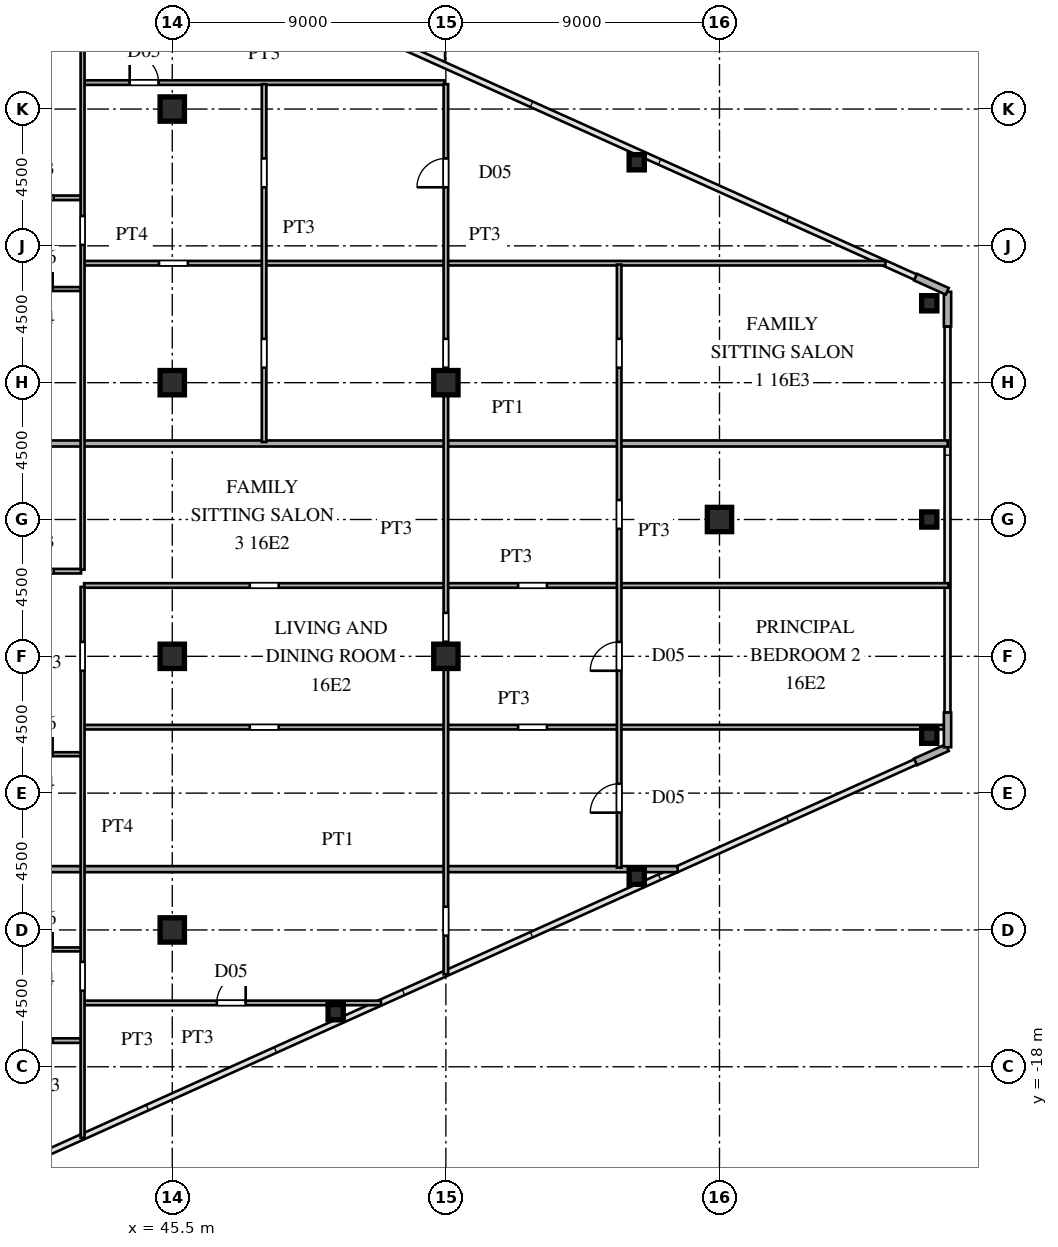
"""IFC4 building model, lengths in metres.
Left out: names, types, materials, properties, quantities, classifications, styles, units other than length and angle.
Written with IfcOpenShell. Run it as: python <this file> out.ifc"""

import sys

from ifc_helpers import new_model, si_unit, direction, frame, frame_2d, origin, origin_2d, place, context, subcontext, project, spatial, rectangle, hollow_rectangle, i_section, extrude, source, transform, mapped, element, fill, save


model = new_model("IFC4")
c1 = context("Model", 3, precision=1e-05, world=origin(), true_north=direction((0.0, 1.0)))
c2 = subcontext(c1, "Body", "Model", "MODEL_VIEW")
j1 = project(units=[si_unit("LENGTHUNIT", "METRE"), si_unit("PLANEANGLEUNIT", "RADIAN")], contexts=[c1])
p1 = place(None, origin())
s1 = spatial("IfcSite", under=j1, at=p1, CompositionType="ELEMENT")
p2 = place(p1, origin())
s2 = spatial("IfcBuilding", under=s1, at=p2, CompositionType="ELEMENT")
p3 = place(p2, frame((0.0, 0.0, 62.1)))
s3 = spatial("IfcBuildingStorey", under=s2, at=p3, CompositionType="ELEMENT", Elevation=62.1)
m1 = source(origin(), c2, "Body", "SweptSolid", [
    extrude(i_section(OverallWidth=0.8, OverallDepth=0.8, WebThickness=0.032, FlangeThickness=0.05, at=origin_2d()), origin(), (0.0, 0.0, 1.0), 3.6),
])
for number, where, z_axis, x_axis in (
    (1, (45.5, -13.5, 0.0), (0.0, 0.0, 1.0), (1.0, 0.0, 0.0)),
    (2, (45.5, -4.5, 0.0), (0.0, 0.0, 1.0), (1.0, 0.0, 0.0)),
    (3, (45.5, 4.5, 0.0), (0.0, 0.0, 1.0), (1.0, 0.0, 0.0)),
    (4, (45.5, 13.5, 0.0), (0.0, 0.0, 1.0), (1.0, 0.0, 0.0)),
    (5, (54.5, -4.5, 0.0), (0.0, 0.0, 1.0), (1.0, 0.0, 0.0)),
    (6, (54.5, 4.5, 0.0), (0.0, 0.0, 1.0), (1.0, 0.0, 0.0)),
    (7, (63.5, 0.0, 0.0), (0.0, 0.0, 1.0), (1.0, 0.0, 0.0)),
):
    element("IfcColumn", number, at=place(p3, frame(where, z_axis=z_axis, x_axis=x_axis)), inside=s3, PredefinedType="COLUMN", context=c2, shape_type="MappedRepresentation", body=[
        mapped(m1, transform((0.0, 0.0, 0.0), scale=1.0)),
    ])
m2 = source(origin(), c2, "Body", "SweptSolid", [
    extrude(hollow_rectangle(XDim=0.5, YDim=0.5, WallThickness=0.02, at=origin_2d()), origin(), (0.0, 0.0, 1.0), 3.6),
])
for number, where, z_axis, x_axis in (
    (8, (70.4, -7.112, 0.0), (0.0, 0.0, 1.0), (1.0, 0.0, 0.0)),
    (9, (70.4, 7.112, 0.0), (0.0, 0.0, 1.0), (1.0, 0.0, 0.0)),
    (10, (50.875, -16.205, 0.0), (0.0, 0.0, 1.0), (1.0, 0.0, 0.0)),
    (11, (60.778, -11.749, 0.0), (0.0, 0.0, 1.0), (1.0, 0.0, 0.0)),
    (12, (60.778, 11.749, 0.0), (0.0, 0.0, 1.0), (1.0, 0.0, 0.0)),
    (13, (70.4, 0.0, 0.0), (0.0, 0.0, 1.0), (1.0, 0.0, 0.0)),
):
    element("IfcColumn", number, at=place(p3, frame(where, z_axis=z_axis, x_axis=x_axis)), inside=s3, PredefinedType="COLUMN", context=c2, shape_type="MappedRepresentation", body=[
        mapped(m2, transform((0.0, 0.0, 0.0), scale=1.0)),
    ])
for number, where, z_axis, x_axis in (
    (14, (69.951, -7.972, 0.0), (0.0, 0.0, 1.0), (0.912, 0.41, 0.0)),
    (15, (71.0, -7.49, 0.0), (0.0, 0.0, 1.0), (0.0, 1.0, 0.0)),
    (16, (71.0, 6.35, 0.0), (0.0, 0.0, 1.0), (0.0, 1.0, 0.0)),
    (17, (70.991, 7.504, 0.0), (0.0, 0.0, 1.0), (-0.912, 0.41, 0.0)),
):
    element("IfcWall", number, at=place(p3, frame(where, z_axis=z_axis, x_axis=x_axis)), inside=s3, PredefinedType="SOLIDWALL", context=c2, shape_type="SweptSolid", body=[
        extrude(rectangle(XDim=1.14, YDim=0.24, at=frame_2d((0.57, 0.0))), origin(), (0.0, 0.0, 1.0), 3.38),
    ])
p4 = place(p3, frame((39.7, -17.14, 0.0), z_axis=(0.0, 0.0, 1.0), x_axis=(1.0, 0.0, 0.0)))
e18 = element("IfcWall", 18, at=p4, inside=s3, PredefinedType="PARTITIONING", context=c2, shape_type="SweptSolid", body=[
    extrude(rectangle(XDim=2.8, YDim=0.15, at=frame_2d((1.4, 0.0))), origin(), (0.0, 0.0, 1.0), 3.38),
])
p5 = place(p4, frame((0.925, 0.0, 0.0)))
e19 = element("IfcOpeningElement", 19, at=p5, cuts=e18, PredefinedType="OPENING", context=c2, shape_type="SweptSolid", body=[
    extrude(rectangle(XDim=0.95, YDim=2.15, at=frame_2d((0.475, 1.075))), frame((0.0, 0.085, 0.0), z_axis=(0.0, -1.0, 0.0), x_axis=(1.0, 0.0, 0.0)), (0.0, 0.0, 1.0), 0.17),
])
p6 = place(p3, frame((42.6, -15.9, 0.0), z_axis=(0.0, 0.0, 1.0), x_axis=(1.0, 0.0, 0.0)))
e20 = element("IfcWall", 20, at=p6, inside=s3, PredefinedType="PARTITIONING", context=c2, shape_type="SweptSolid", body=[
    extrude(rectangle(XDim=9.765, YDim=0.15, at=frame_2d((4.882, 0.0))), origin(), (0.0, 0.0, 1.0), 3.38),
])
p7 = place(p6, frame((4.365, 0.0, 0.0)))
e21 = element("IfcOpeningElement", 21, at=p7, cuts=e20, PredefinedType="OPENING", context=c2, shape_type="SweptSolid", body=[
    extrude(rectangle(XDim=0.95, YDim=2.15, at=frame_2d((0.475, 1.075))), frame((0.0, 0.085, 0.0), z_axis=(0.0, -1.0, 0.0), x_axis=(1.0, 0.0, 0.0)), (0.0, 0.0, 1.0), 0.17),
])
p8 = place(p3, frame((39.75, -14.14, 0.0), z_axis=(0.0, 0.0, 1.0), x_axis=(1.0, 0.0, 0.0)))
e22 = element("IfcWall", 22, at=p8, inside=s3, PredefinedType="PARTITIONING", context=c2, shape_type="SweptSolid", body=[
    extrude(rectangle(XDim=2.75, YDim=0.13, at=frame_2d((1.375, 0.0))), origin(), (0.0, 0.0, 1.0), 3.38),
])
p9 = place(p8, frame((0.935, 0.0, 0.0)))
e23 = element("IfcOpeningElement", 23, at=p9, cuts=e22, PredefinedType="OPENING", context=c2, shape_type="SweptSolid", body=[
    extrude(rectangle(XDim=0.88, YDim=2.1, at=frame_2d((0.44, 1.05))), frame((0.0, 0.075, 0.0), z_axis=(0.0, -1.0, 0.0), x_axis=(1.0, 0.0, 0.0)), (0.0, 0.0, 1.0), 0.15),
])
p10 = place(p3, frame((39.78, -11.5, 0.0), z_axis=(0.0, 0.0, 1.0), x_axis=(1.0, 0.0, 0.0)))
e24 = element("IfcWall", 24, at=p10, inside=s3, PredefinedType="PARTITIONING", context=c2, shape_type="SweptSolid", body=[
    extrude(rectangle(XDim=22.343, YDim=0.2, at=frame_2d((11.171, 0.0))), origin(), (0.0, 0.0, 1.0), 3.38),
])
p11 = place(p3, frame((39.75, -7.72, 0.0), z_axis=(0.0, 0.0, 1.0), x_axis=(1.0, 0.0, 0.0)))
e25 = element("IfcWall", 25, at=p11, inside=s3, PredefinedType="PARTITIONING", context=c2, shape_type="SweptSolid", body=[
    extrude(rectangle(XDim=2.75, YDim=0.13, at=frame_2d((1.375, 0.0))), origin(), (0.0, 0.0, 1.0), 3.38),
])
p12 = place(p11, frame((0.935, 0.0, 0.0)))
e26 = element("IfcOpeningElement", 26, at=p12, cuts=e25, PredefinedType="OPENING", context=c2, shape_type="SweptSolid", body=[
    extrude(rectangle(XDim=0.88, YDim=2.1, at=frame_2d((0.44, 1.05))), frame((0.0, 0.075, 0.0), z_axis=(0.0, -1.0, 0.0), x_axis=(1.0, 0.0, 0.0)), (0.0, 0.0, 1.0), 0.15),
])
p13 = place(p3, frame((42.6, -6.83, 0.0), z_axis=(0.0, 0.0, 1.0), x_axis=(1.0, 0.0, 0.0)))
e27 = element("IfcWall", 27, at=p13, inside=s3, PredefinedType="PARTITIONING", context=c2, shape_type="SweptSolid", body=[
    extrude(rectangle(XDim=28.275, YDim=0.15, at=frame_2d((14.137, 0.0))), origin(), (0.0, 0.0, 1.0), 3.38),
])
p14 = place(p13, frame((5.45, 0.0, 0.0)))
e28 = element("IfcOpeningElement", 28, at=p14, cuts=e27, PredefinedType="OPENING", context=c2, shape_type="SweptSolid", body=[
    extrude(rectangle(XDim=0.95, YDim=2.15, at=frame_2d((0.475, 1.075))), frame((0.0, 0.085, 0.0), z_axis=(0.0, -1.0, 0.0), x_axis=(1.0, 0.0, 0.0)), (0.0, 0.0, 1.0), 0.17),
])
p15 = place(p13, frame((14.275, 0.0, 0.0)))
e29 = element("IfcOpeningElement", 29, at=p15, cuts=e27, PredefinedType="OPENING", context=c2, shape_type="SweptSolid", body=[
    extrude(rectangle(XDim=0.95, YDim=2.15, at=frame_2d((0.475, 1.075))), frame((0.0, 0.085, 0.0), z_axis=(0.0, -1.0, 0.0), x_axis=(1.0, 0.0, 0.0)), (0.0, 0.0, 1.0), 0.17),
])
p16 = place(p3, frame((42.6, -2.17, 0.0), z_axis=(0.0, 0.0, 1.0), x_axis=(1.0, 0.0, 0.0)))
e30 = element("IfcWall", 30, at=p16, inside=s3, PredefinedType="PARTITIONING", context=c2, shape_type="SweptSolid", body=[
    extrude(rectangle(XDim=28.435, YDim=0.15, at=frame_2d((14.217, 0.0))), origin(), (0.0, 0.0, 1.0), 3.38),
])
p17 = place(p16, frame((5.45, 0.0, 0.0)))
e31 = element("IfcOpeningElement", 31, at=p17, cuts=e30, PredefinedType="OPENING", context=c2, shape_type="SweptSolid", body=[
    extrude(rectangle(XDim=0.95, YDim=2.15, at=frame_2d((0.475, 1.075))), frame((0.0, 0.085, 0.0), z_axis=(0.0, -1.0, 0.0), x_axis=(1.0, 0.0, 0.0)), (0.0, 0.0, 1.0), 0.17),
])
p18 = place(p16, frame((14.275, 0.0, 0.0)))
e32 = element("IfcOpeningElement", 32, at=p18, cuts=e30, PredefinedType="OPENING", context=c2, shape_type="SweptSolid", body=[
    extrude(rectangle(XDim=0.95, YDim=2.15, at=frame_2d((0.475, 1.075))), frame((0.0, 0.085, 0.0), z_axis=(0.0, -1.0, 0.0), x_axis=(1.0, 0.0, 0.0)), (0.0, 0.0, 1.0), 0.17),
])
p19 = place(p3, frame((39.75, -1.7, 0.0), z_axis=(0.0, 0.0, 1.0), x_axis=(1.0, 0.0, 0.0)))
e33 = element("IfcWall", 33, at=p19, inside=s3, PredefinedType="PARTITIONING", context=c2, shape_type="SweptSolid", body=[
    extrude(rectangle(XDim=2.75, YDim=0.15, at=frame_2d((1.375, 0.0))), origin(), (0.0, 0.0, 1.0), 3.38),
])
p20 = place(p19, frame((0.9, 0.0, 0.0)))
e34 = element("IfcOpeningElement", 34, at=p20, cuts=e33, PredefinedType="OPENING", context=c2, shape_type="SweptSolid", body=[
    extrude(rectangle(XDim=0.95, YDim=2.15, at=frame_2d((0.475, 1.075))), frame((0.0, 0.085, 0.0), z_axis=(0.0, -1.0, 0.0), x_axis=(1.0, 0.0, 0.0)), (0.0, 0.0, 1.0), 0.17),
])
p21 = place(p3, frame((39.78, 2.5, 0.0), z_axis=(0.0, 0.0, 1.0), x_axis=(1.0, 0.0, 0.0)))
e35 = element("IfcWall", 35, at=p21, inside=s3, PredefinedType="PARTITIONING", context=c2, shape_type="SweptSolid", body=[
    extrude(rectangle(XDim=31.225, YDim=0.2, at=frame_2d((15.612, 0.0))), origin(), (0.0, 0.0, 1.0), 3.38),
])
p22 = place(p3, frame((39.75, 7.58, 0.0), z_axis=(0.0, 0.0, 1.0), x_axis=(1.0, 0.0, 0.0)))
e36 = element("IfcWall", 36, at=p22, inside=s3, PredefinedType="PARTITIONING", context=c2, shape_type="SweptSolid", body=[
    extrude(rectangle(XDim=2.75, YDim=0.13, at=frame_2d((1.375, 0.0))), origin(), (0.0, 0.0, 1.0), 3.38),
])
p23 = place(p22, frame((0.935, 0.0, 0.0)))
e37 = element("IfcOpeningElement", 37, at=p23, cuts=e36, PredefinedType="OPENING", context=c2, shape_type="SweptSolid", body=[
    extrude(rectangle(XDim=0.88, YDim=2.1, at=frame_2d((0.44, 1.05))), frame((0.0, 0.075, 0.0), z_axis=(0.0, -1.0, 0.0), x_axis=(1.0, 0.0, 0.0)), (0.0, 0.0, 1.0), 0.15),
])
p24 = place(p3, frame((42.6, 8.43, 0.0), z_axis=(0.0, 0.0, 1.0), x_axis=(1.0, 0.0, 0.0)))
e38 = element("IfcWall", 38, at=p24, inside=s3, PredefinedType="PARTITIONING", context=c2, shape_type="SweptSolid", body=[
    extrude(rectangle(XDim=26.359, YDim=0.15, at=frame_2d((13.179, 0.0))), origin(), (0.0, 0.0, 1.0), 3.38),
])
p25 = place(p24, frame((2.462, 0.0, 0.0)))
e39 = element("IfcOpeningElement", 39, at=p25, cuts=e38, PredefinedType="OPENING", context=c2, shape_type="SweptSolid", body=[
    extrude(rectangle(XDim=0.95, YDim=2.15, at=frame_2d((0.475, 1.075))), frame((0.0, 0.085, 0.0), z_axis=(0.0, -1.0, 0.0), x_axis=(1.0, 0.0, 0.0)), (0.0, 0.0, 1.0), 0.17),
])
p26 = place(p3, frame((39.75, 10.58, 0.0), z_axis=(0.0, 0.0, 1.0), x_axis=(1.0, 0.0, 0.0)))
e40 = element("IfcWall", 40, at=p26, inside=s3, PredefinedType="PARTITIONING", context=c2, shape_type="SweptSolid", body=[
    extrude(rectangle(XDim=2.75, YDim=0.15, at=frame_2d((1.375, 0.0))), origin(), (0.0, 0.0, 1.0), 3.38),
])
p27 = place(p26, frame((0.9, 0.0, 0.0)))
e41 = element("IfcOpeningElement", 41, at=p27, cuts=e40, PredefinedType="OPENING", context=c2, shape_type="SweptSolid", body=[
    extrude(rectangle(XDim=0.95, YDim=2.15, at=frame_2d((0.475, 1.075))), frame((0.0, 0.085, 0.0), z_axis=(0.0, -1.0, 0.0), x_axis=(1.0, 0.0, 0.0)), (0.0, 0.0, 1.0), 0.17),
])
p28 = place(p3, frame((42.6, 14.37, 0.0), z_axis=(0.0, 0.0, 1.0), x_axis=(1.0, 0.0, 0.0)))
e42 = element("IfcWall", 42, at=p28, inside=s3, PredefinedType="PARTITIONING", context=c2, shape_type="SweptSolid", body=[
    extrude(rectangle(XDim=11.85, YDim=0.15, at=frame_2d((5.925, 0.0))), origin(), (0.0, 0.0, 1.0), 3.38),
])
p29 = place(p28, frame((1.5, 0.0, 0.0)))
e43 = element("IfcOpeningElement", 43, at=p29, cuts=e42, PredefinedType="OPENING", context=c2, shape_type="SweptSolid", body=[
    extrude(rectangle(XDim=0.95, YDim=2.15, at=frame_2d((0.475, 1.075))), frame((0.0, 0.085, 0.0), z_axis=(0.0, -1.0, 0.0), x_axis=(1.0, 0.0, 0.0)), (0.0, 0.0, 1.0), 0.17),
])
p30 = place(p3, frame((42.55, -20.337, 0.0), z_axis=(0.0, 0.0, 1.0), x_axis=(0.0, 1.0, 0.0)))
e44 = element("IfcWall", 44, at=p30, inside=s3, PredefinedType="PARTITIONING", context=c2, shape_type="SweptSolid", body=[
    extrude(rectangle(XDim=18.12, YDim=0.13, at=frame_2d((9.06, 0.0))), origin(), (0.0, 0.0, 1.0), 3.38),
])
p31 = place(p30, frame((4.839, 0.0, 0.0)))
e45 = element("IfcOpeningElement", 45, at=p31, cuts=e44, PredefinedType="OPENING", context=c2, shape_type="SweptSolid", body=[
    extrude(rectangle(XDim=0.95, YDim=2.15, at=frame_2d((0.475, 1.075))), frame((0.0, 0.075, 0.0), z_axis=(0.0, -1.0, 0.0), x_axis=(1.0, 0.0, 0.0)), (0.0, 0.0, 1.0), 0.15),
])
p32 = place(p30, frame((15.362, 0.0, 0.0)))
e46 = element("IfcOpeningElement", 46, at=p32, cuts=e44, PredefinedType="OPENING", context=c2, shape_type="SweptSolid", body=[
    extrude(rectangle(XDim=0.95, YDim=2.15, at=frame_2d((0.475, 1.075))), frame((0.0, 0.075, 0.0), z_axis=(0.0, -1.0, 0.0), x_axis=(1.0, 0.0, 0.0)), (0.0, 0.0, 1.0), 0.15),
])
p33 = place(p3, frame((42.55, -1.648, 0.0), z_axis=(0.0, 0.0, 1.0), x_axis=(0.0, 1.0, 0.0)))
e47 = element("IfcWall", 47, at=p33, inside=s3, PredefinedType="PARTITIONING", context=c2, shape_type="SweptSolid", body=[
    extrude(rectangle(XDim=21.985, YDim=0.13, at=frame_2d((10.992, 0.0))), origin(), (0.0, 0.0, 1.0), 3.38),
])
p34 = place(p33, frame((10.679, 0.0, 0.0)))
e48 = element("IfcOpeningElement", 48, at=p34, cuts=e47, PredefinedType="OPENING", context=c2, shape_type="SweptSolid", body=[
    extrude(rectangle(XDim=0.95, YDim=2.15, at=frame_2d((0.475, 1.075))), frame((0.0, 0.075, 0.0), z_axis=(0.0, -1.0, 0.0), x_axis=(1.0, 0.0, 0.0)), (0.0, 0.0, 1.0), 0.15),
])
p35 = place(p3, frame((48.52, 2.55, 0.0), z_axis=(0.0, 0.0, 1.0), x_axis=(0.0, 1.0, 0.0)))
e49 = element("IfcWall", 49, at=p35, inside=s3, PredefinedType="PARTITIONING", context=c2, shape_type="SweptSolid", body=[
    extrude(rectangle(XDim=11.768, YDim=0.15, at=frame_2d((5.884, 0.0))), origin(), (0.0, 0.0, 1.0), 3.38),
])
p36 = place(p35, frame((8.376, 0.0, 0.0)))
e50 = element("IfcOpeningElement", 50, at=p36, cuts=e49, PredefinedType="OPENING", context=c2, shape_type="SweptSolid", body=[
    extrude(rectangle(XDim=0.95, YDim=2.15, at=frame_2d((0.475, 1.075))), frame((0.0, 0.085, 0.0), z_axis=(0.0, -1.0, 0.0), x_axis=(1.0, 0.0, 0.0)), (0.0, 0.0, 1.0), 0.17),
])
p37 = place(p35, frame((2.442, 0.0, 0.0)))
e51 = element("IfcOpeningElement", 51, at=p37, cuts=e49, PredefinedType="OPENING", context=c2, shape_type="SweptSolid", body=[
    extrude(rectangle(XDim=0.95, YDim=2.15, at=frame_2d((0.475, 1.075))), frame((0.0, 0.085, 0.0), z_axis=(0.0, -1.0, 0.0), x_axis=(1.0, 0.0, 0.0)), (0.0, 0.0, 1.0), 0.17),
])
p38 = place(p3, frame((54.5, -14.96, 0.0), z_axis=(0.0, 0.0, 1.0), x_axis=(0.0, 1.0, 0.0)))
e52 = element("IfcWall", 52, at=p38, inside=s3, PredefinedType="PARTITIONING", context=c2, shape_type="SweptSolid", body=[
    extrude(rectangle(XDim=29.278, YDim=0.15, at=frame_2d((14.639, 0.0))), origin(), (0.0, 0.0, 1.0), 2.68),
])
p39 = place(p38, frame((1.272, 0.0, 0.0)))
e53 = element("IfcOpeningElement", 53, at=p39, cuts=e52, PredefinedType="OPENING", context=c2, shape_type="SweptSolid", body=[
    extrude(rectangle(XDim=0.95, YDim=2.15, at=frame_2d((0.475, 1.075))), frame((0.0, 0.085, 0.0), z_axis=(0.0, -1.0, 0.0), x_axis=(1.0, 0.0, 0.0)), (0.0, 0.0, 1.0), 0.17),
])
p40 = place(p38, frame((10.94, 0.0, 0.0)))
e54 = element("IfcOpeningElement", 54, at=p40, cuts=e52, PredefinedType="OPENING", context=c2, shape_type="SweptSolid", body=[
    extrude(rectangle(XDim=0.95, YDim=2.15, at=frame_2d((0.475, 1.075))), frame((0.0, 0.085, 0.0), z_axis=(0.0, -1.0, 0.0), x_axis=(1.0, 0.0, 0.0)), (0.0, 0.0, 1.0), 0.17),
])
p41 = place(p38, frame((25.886, 0.0, 0.0)))
e55 = element("IfcOpeningElement", 55, at=p41, cuts=e52, PredefinedType="OPENING", context=c2, shape_type="SweptSolid", body=[
    extrude(rectangle(XDim=0.95, YDim=2.15, at=frame_2d((0.475, 1.075))), frame((0.0, 0.085, 0.0), z_axis=(0.0, -1.0, 0.0), x_axis=(1.0, 0.0, 0.0)), (0.0, 0.0, 1.0), 0.17),
])
p42 = place(p38, frame((19.952, 0.0, 0.0)))
e56 = element("IfcOpeningElement", 56, at=p42, cuts=e52, PredefinedType="OPENING", context=c2, shape_type="SweptSolid", body=[
    extrude(rectangle(XDim=0.95, YDim=2.15, at=frame_2d((0.475, 1.075))), frame((0.0, 0.085, 0.0), z_axis=(0.0, -1.0, 0.0), x_axis=(1.0, 0.0, 0.0)), (0.0, 0.0, 1.0), 0.17),
])
p43 = place(p3, frame((60.2, -11.45, 0.0), z_axis=(0.0, 0.0, 1.0), x_axis=(0.0, 1.0, 0.0)))
e57 = element("IfcWall", 57, at=p43, inside=s3, PredefinedType="PARTITIONING", context=c2, shape_type="SweptSolid", body=[
    extrude(rectangle(XDim=19.834, YDim=0.15, at=frame_2d((9.917, 0.0))), origin(), (0.0, 0.0, 1.0), 3.38),
])
p44 = place(p43, frame((1.808, 0.0, 0.0)))
e58 = element("IfcOpeningElement", 58, at=p44, cuts=e57, PredefinedType="OPENING", context=c2, shape_type="SweptSolid", body=[
    extrude(rectangle(XDim=0.95, YDim=2.15, at=frame_2d((0.475, 1.075))), frame((0.0, 0.085, 0.0), z_axis=(0.0, -1.0, 0.0), x_axis=(1.0, 0.0, 0.0)), (0.0, 0.0, 1.0), 0.17),
])
p45 = place(p43, frame((6.475, 0.0, 0.0)))
e59 = element("IfcOpeningElement", 59, at=p45, cuts=e57, PredefinedType="OPENING", context=c2, shape_type="SweptSolid", body=[
    extrude(rectangle(XDim=0.95, YDim=2.15, at=frame_2d((0.475, 1.075))), frame((0.0, 0.085, 0.0), z_axis=(0.0, -1.0, 0.0), x_axis=(1.0, 0.0, 0.0)), (0.0, 0.0, 1.0), 0.17),
])
p46 = place(p43, frame((11.142, 0.0, 0.0)))
e60 = element("IfcOpeningElement", 60, at=p46, cuts=e57, PredefinedType="OPENING", context=c2, shape_type="SweptSolid", body=[
    extrude(rectangle(XDim=0.95, YDim=2.15, at=frame_2d((0.475, 1.075))), frame((0.0, 0.085, 0.0), z_axis=(0.0, -1.0, 0.0), x_axis=(1.0, 0.0, 0.0)), (0.0, 0.0, 1.0), 0.17),
])
p47 = place(p43, frame((16.442, 0.0, 0.0)))
e61 = element("IfcOpeningElement", 61, at=p47, cuts=e57, PredefinedType="OPENING", context=c2, shape_type="SweptSolid", body=[
    extrude(rectangle(XDim=0.95, YDim=2.15, at=frame_2d((0.475, 1.075))), frame((0.0, 0.085, 0.0), z_axis=(0.0, -1.0, 0.0), x_axis=(1.0, 0.0, 0.0)), (0.0, 0.0, 1.0), 0.17),
])
m3 = source(origin(), c2, "Body", "SweptSolid", [
    extrude(rectangle(XDim=0.95, YDim=2.15, at=frame_2d((0.475, 1.075))), frame((0.0, 0.025, 0.0), z_axis=(0.0, -1.0, 0.0), x_axis=(1.0, 0.0, 0.0)), (0.0, 0.0, 1.0), 0.05),
])
p48 = place(p7, origin())
e62 = element("IfcDoor", 62, at=p48, inside=s3, OperationType="SINGLE_SWING_RIGHT", PredefinedType="DOOR", context=c2, shape_type="MappedRepresentation", body=[
    mapped(m3, transform((0.0, 0.0, 0.0), scale=1.0)),
])
fill(e21, e62)
m4 = source(origin(), c2, "Body", "SweptSolid", [
    extrude(rectangle(XDim=0.88, YDim=2.1, at=frame_2d((0.44, 1.05))), frame((0.0, 0.025, 0.0), z_axis=(0.0, -1.0, 0.0), x_axis=(1.0, 0.0, 0.0)), (0.0, 0.0, 1.0), 0.05),
])
p49 = place(p9, origin())
e63 = element("IfcDoor", 63, at=p49, inside=s3, OperationType="SINGLE_SWING_RIGHT", PredefinedType="DOOR", context=c2, shape_type="MappedRepresentation", body=[
    mapped(m4, transform((0.0, 0.0, 0.0), scale=1.0)),
])
fill(e23, e63)
p50 = place(p12, origin())
e64 = element("IfcDoor", 64, at=p50, inside=s3, OperationType="SINGLE_SWING_RIGHT", PredefinedType="DOOR", context=c2, shape_type="MappedRepresentation", body=[
    mapped(m4, transform((0.0, 0.0, 0.0), scale=1.0)),
])
fill(e26, e64)
p51 = place(p23, origin())
e65 = element("IfcDoor", 65, at=p51, inside=s3, OperationType="SINGLE_SWING_RIGHT", PredefinedType="DOOR", context=c2, shape_type="MappedRepresentation", body=[
    mapped(m4, transform((0.0, 0.0, 0.0), scale=1.0)),
])
fill(e37, e65)
p52 = place(p29, origin())
e66 = element("IfcDoor", 66, at=p52, inside=s3, OperationType="SINGLE_SWING_LEFT", PredefinedType="DOOR", context=c2, shape_type="MappedRepresentation", body=[
    mapped(m3, transform((0.0, 0.0, 0.0), scale=1.0)),
])
fill(e43, e66)
p53 = place(p41, origin())
e67 = element("IfcDoor", 67, at=p53, inside=s3, OperationType="SINGLE_SWING_LEFT", PredefinedType="DOOR", context=c2, shape_type="MappedRepresentation", body=[
    mapped(m3, transform((0.0, 0.0, 0.0), scale=1.0)),
])
fill(e55, e67)
p54 = place(p44, origin())
e68 = element("IfcDoor", 68, at=p54, inside=s3, OperationType="SINGLE_SWING_LEFT", PredefinedType="DOOR", context=c2, shape_type="MappedRepresentation", body=[
    mapped(m3, transform((0.0, 0.0, 0.0), scale=1.0)),
])
fill(e58, e68)
p55 = place(p45, origin())
e69 = element("IfcDoor", 69, at=p55, inside=s3, OperationType="SINGLE_SWING_LEFT", PredefinedType="DOOR", context=c2, shape_type="MappedRepresentation", body=[
    mapped(m3, transform((0.0, 0.0, 0.0), scale=1.0)),
])
fill(e59, e69)
save(model, sys.argv[1])
